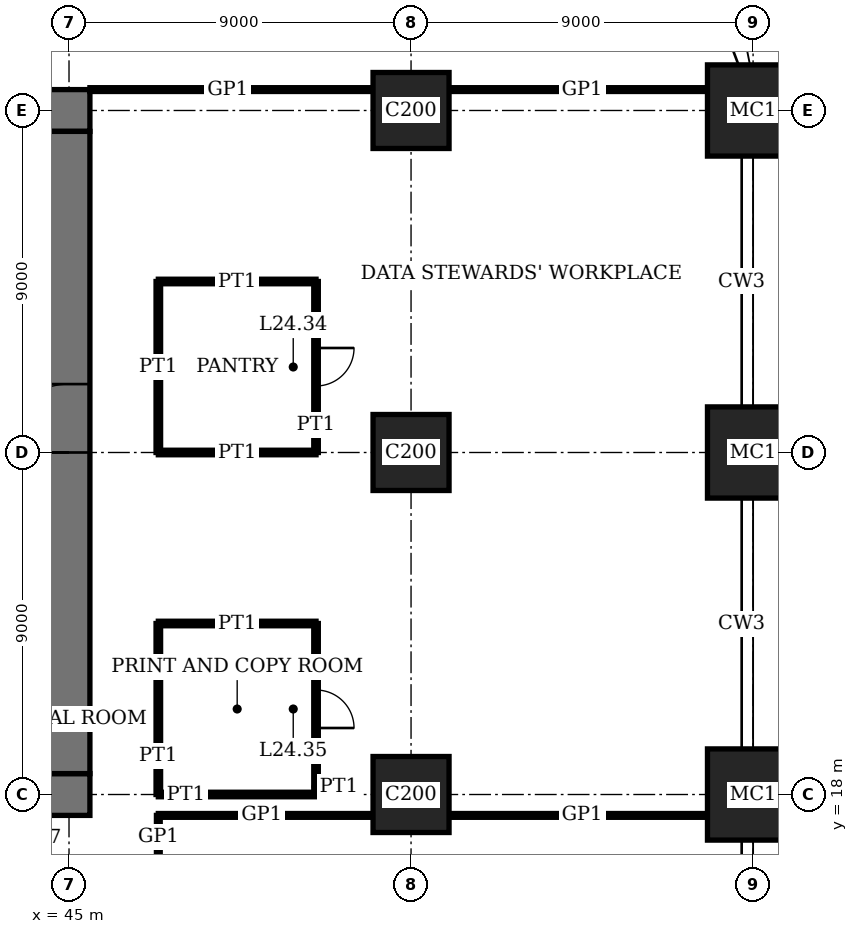
"""IFC4 building model, lengths in metres.
Left out: names, types, materials, properties, quantities, classifications, styles, units other than length and angle.
Written with IfcOpenShell. Run it as: python <this file> out.ifc"""

import sys

from ifc_helpers import new_model, si_unit, direction, frame, frame_2d, origin, origin_2d, place, context, subcontext, project, spatial, rectangle, extrude, element, fill, save


model = new_model("IFC4")
c1 = context("Model", 3, precision=1e-05, world=origin(), true_north=direction((0.0, 1.0)))
c2 = subcontext(c1, "Body", "Model", "MODEL_VIEW")
j1 = project(units=[si_unit("LENGTHUNIT", "METRE"), si_unit("PLANEANGLEUNIT", "RADIAN")], contexts=[c1])
p1 = place(None, origin())
s1 = spatial("IfcSite", under=j1, at=p1, CompositionType="ELEMENT")
p2 = place(p1, origin())
s2 = spatial("IfcBuilding", under=s1, at=p2, CompositionType="ELEMENT")
p3 = place(p2, frame((0.0, 0.0, 101.0)))
s3 = spatial("IfcBuildingStorey", under=s2, at=p3, CompositionType="ELEMENT", Elevation=101.0)
for number, where, z_axis, x_axis in (
    (1, (54.0, 18.0, 0.0), (0.0, 0.0, 1.0), (1.0, 0.0, 0.0)),
    (2, (54.0, 27.0, 0.0), (0.0, 0.0, 1.0), (1.0, 0.0, 0.0)),
    (3, (54.0, 36.0, 0.0), (0.0, 0.0, 1.0), (1.0, 0.0, 0.0)),
):
    element("IfcColumn", number, at=place(p3, frame(where, z_axis=z_axis, x_axis=x_axis)), inside=s3, PredefinedType="COLUMN", context=c2, shape_type="SweptSolid", body=[
        extrude(rectangle(XDim=2.0, YDim=2.0, at=origin_2d()), origin(), (0.0, 0.0, 1.0), 4.0),
    ])
for number, where, z_axis, x_axis in (
    (4, (63.0, 18.0, 0.0), (0.0, 0.0, 1.0), (1.0, 0.0, 0.0)),
    (5, (63.0, 27.0, 0.0), (0.0, 0.0, 1.0), (1.0, 0.0, 0.0)),
    (6, (63.0, 36.0, 0.0), (0.0, 0.0, 1.0), (1.0, 0.0, 0.0)),
):
    element("IfcColumn", number, at=place(p3, frame(where, z_axis=z_axis, x_axis=x_axis)), inside=s3, PredefinedType="COLUMN", context=c2, shape_type="SweptSolid", body=[
        extrude(rectangle(XDim=2.4, YDim=2.4, at=origin_2d()), origin(), (0.0, 0.0, 1.0), 4.0),
    ])
p4 = place(p3, frame((17.45, 18.0, 0.0), z_axis=(0.0, 0.0, 1.0), x_axis=(1.0, 0.0, 0.0)))
e7 = element("IfcWall", 7, at=p4, inside=s3, PredefinedType="SHEAR", context=c2, shape_type="SweptSolid", body=[
    extrude(rectangle(XDim=28.1, YDim=1.1, at=frame_2d((14.05, 0.0))), origin(), (0.0, 0.0, 1.0), 4.0),
])
p5 = place(p4, frame((11.55, 0.0, 0.0)))
e8 = element("IfcOpeningElement", 8, at=p5, cuts=e7, PredefinedType="OPENING", context=c2, shape_type="SweptSolid", body=[
    extrude(rectangle(XDim=1.0, YDim=2.4, at=frame_2d((0.5, 1.2))), frame((0.0, 0.56, 0.0), z_axis=(0.0, -1.0, 0.0), x_axis=(1.0, 0.0, 0.0)), (0.0, 0.0, 1.0), 1.12),
])
p6 = place(p4, frame((16.55, 0.0, 0.0)))
e9 = element("IfcOpeningElement", 9, at=p6, cuts=e7, PredefinedType="OPENING", context=c2, shape_type="SweptSolid", body=[
    extrude(rectangle(XDim=1.0, YDim=2.4, at=frame_2d((0.5, 1.2))), frame((0.0, 0.56, 0.0), z_axis=(0.0, -1.0, 0.0), x_axis=(1.0, 0.0, 0.0)), (0.0, 0.0, 1.0), 1.12),
])
p7 = place(p4, frame((20.0, 0.0, 0.0)))
e10 = element("IfcOpeningElement", 10, at=p7, cuts=e7, PredefinedType="OPENING", context=c2, shape_type="SweptSolid", body=[
    extrude(rectangle(XDim=1.1, YDim=2.4, at=frame_2d((0.55, 1.2))), frame((0.0, 0.56, 0.0), z_axis=(0.0, -1.0, 0.0), x_axis=(1.0, 0.0, 0.0)), (0.0, 0.0, 1.0), 1.12),
])
p8 = place(p4, frame((24.05, 0.0, 0.0)))
e11 = element("IfcOpeningElement", 11, at=p8, cuts=e7, PredefinedType="OPENING", context=c2, shape_type="SweptSolid", body=[
    extrude(rectangle(XDim=1.0, YDim=2.4, at=frame_2d((0.5, 1.2))), frame((0.0, 0.56, 0.0), z_axis=(0.0, -1.0, 0.0), x_axis=(1.0, 0.0, 0.0)), (0.0, 0.0, 1.0), 1.12),
])
p9 = place(p3, frame((45.55, 36.0, 0.0), z_axis=(0.0, 0.0, 1.0), x_axis=(-1.0, 0.0, 0.0)))
e12 = element("IfcWall", 12, at=p9, inside=s3, PredefinedType="SHEAR", context=c2, shape_type="SweptSolid", body=[
    extrude(rectangle(XDim=28.1, YDim=1.1, at=frame_2d((14.05, 0.0))), origin(), (0.0, 0.0, 1.0), 4.0),
])
p10 = place(p9, frame((11.55, 0.0, 0.0)))
e13 = element("IfcOpeningElement", 13, at=p10, cuts=e12, PredefinedType="OPENING", context=c2, shape_type="SweptSolid", body=[
    extrude(rectangle(XDim=1.0, YDim=2.4, at=frame_2d((0.5, 1.2))), frame((0.0, 0.56, 0.0), z_axis=(0.0, -1.0, 0.0), x_axis=(1.0, 0.0, 0.0)), (0.0, 0.0, 1.0), 1.12),
])
p11 = place(p9, frame((16.55, 0.0, 0.0)))
e14 = element("IfcOpeningElement", 14, at=p11, cuts=e12, PredefinedType="OPENING", context=c2, shape_type="SweptSolid", body=[
    extrude(rectangle(XDim=1.0, YDim=2.4, at=frame_2d((0.5, 1.2))), frame((0.0, 0.56, 0.0), z_axis=(0.0, -1.0, 0.0), x_axis=(1.0, 0.0, 0.0)), (0.0, 0.0, 1.0), 1.12),
])
p12 = place(p9, frame((20.0, 0.0, 0.0)))
e15 = element("IfcOpeningElement", 15, at=p12, cuts=e12, PredefinedType="OPENING", context=c2, shape_type="SweptSolid", body=[
    extrude(rectangle(XDim=1.1, YDim=2.4, at=frame_2d((0.55, 1.2))), frame((0.0, 0.56, 0.0), z_axis=(0.0, -1.0, 0.0), x_axis=(1.0, 0.0, 0.0)), (0.0, 0.0, 1.0), 1.12),
])
p13 = place(p9, frame((24.05, 0.0, 0.0)))
e16 = element("IfcOpeningElement", 16, at=p13, cuts=e12, PredefinedType="OPENING", context=c2, shape_type="SweptSolid", body=[
    extrude(rectangle(XDim=1.0, YDim=2.4, at=frame_2d((0.5, 1.2))), frame((0.0, 0.56, 0.0), z_axis=(0.0, -1.0, 0.0), x_axis=(1.0, 0.0, 0.0)), (0.0, 0.0, 1.0), 1.12),
])
p14 = place(p3, frame((45.0, 18.55, 0.0), z_axis=(0.0, 0.0, 1.0), x_axis=(0.0, 1.0, 0.0)))
e17 = element("IfcWall", 17, at=p14, inside=s3, PredefinedType="SHEAR", context=c2, shape_type="SweptSolid", body=[
    extrude(rectangle(XDim=16.9, YDim=1.1, at=frame_2d((8.45, 0.0))), origin(), (0.0, 0.0, 1.0), 4.0),
])
p15 = place(p14, frame((8.45, 0.0, 0.0)))
e18 = element("IfcOpeningElement", 18, at=p15, cuts=e17, PredefinedType="OPENING", context=c2, shape_type="SweptSolid", body=[
    extrude(rectangle(XDim=1.8, YDim=2.4, at=frame_2d((0.9, 1.2))), frame((0.0, 0.56, 0.0), z_axis=(0.0, -1.0, 0.0), x_axis=(1.0, 0.0, 0.0)), (0.0, 0.0, 1.0), 1.12),
])
p16 = place(p3, frame((47.35, 17.45, 0.0), z_axis=(0.0, 0.0, 1.0), x_axis=(1.0, 0.0, 0.0)))
e19 = element("IfcWall", 19, at=p16, inside=s3, PredefinedType="PARTITIONING", context=c2, shape_type="SweptSolid", body=[
    extrude(rectangle(XDim=5.65, YDim=0.1, at=frame_2d((2.825, 0.0))), origin(), (0.0, 0.0, 1.0), 3.75),
])
p17 = place(p3, frame((55.0, 17.45, 0.0), z_axis=(0.0, 0.0, 1.0), x_axis=(1.0, 0.0, 0.0)))
e20 = element("IfcWall", 20, at=p17, inside=s3, PredefinedType="PARTITIONING", context=c2, shape_type="SweptSolid", body=[
    extrude(rectangle(XDim=6.8, YDim=0.1, at=frame_2d((3.4, 0.0))), origin(), (0.0, 0.0, 1.0), 3.75),
])
p18 = place(p3, frame((47.35, 18.0, 0.0), z_axis=(0.0, 0.0, 1.0), x_axis=(1.0, 0.0, 0.0)))
e21 = element("IfcWall", 21, at=p18, inside=s3, PredefinedType="PARTITIONING", context=c2, shape_type="SweptSolid", body=[
    extrude(rectangle(XDim=4.15, YDim=0.12, at=frame_2d((2.075, 0.0))), origin(), (0.0, 0.0, 1.0), 3.05),
])
p19 = place(p3, frame((47.35, 22.5, 0.0), z_axis=(0.0, 0.0, 1.0), x_axis=(1.0, 0.0, 0.0)))
e22 = element("IfcWall", 22, at=p19, inside=s3, PredefinedType="PARTITIONING", context=c2, shape_type="SweptSolid", body=[
    extrude(rectangle(XDim=4.15, YDim=0.12, at=frame_2d((2.075, 0.0))), origin(), (0.0, 0.0, 1.0), 3.1),
])
p20 = place(p3, frame((47.35, 27.0, 0.0), z_axis=(0.0, 0.0, 1.0), x_axis=(1.0, 0.0, 0.0)))
e23 = element("IfcWall", 23, at=p20, inside=s3, PredefinedType="PARTITIONING", context=c2, shape_type="SweptSolid", body=[
    extrude(rectangle(XDim=4.15, YDim=0.12, at=frame_2d((2.075, 0.0))), origin(), (0.0, 0.0, 1.0), 3.05),
])
p21 = place(p3, frame((47.35, 31.5, 0.0), z_axis=(0.0, 0.0, 1.0), x_axis=(1.0, 0.0, 0.0)))
e24 = element("IfcWall", 24, at=p21, inside=s3, PredefinedType="PARTITIONING", context=c2, shape_type="SweptSolid", body=[
    extrude(rectangle(XDim=4.15, YDim=0.12, at=frame_2d((2.075, 0.0))), origin(), (0.0, 0.0, 1.0), 3.1),
])
p22 = place(p3, frame((45.55, 36.55, 0.0), z_axis=(0.0, 0.0, 1.0), x_axis=(1.0, 0.0, 0.0)))
e25 = element("IfcWall", 25, at=p22, inside=s3, PredefinedType="PARTITIONING", context=c2, shape_type="SweptSolid", body=[
    extrude(rectangle(XDim=7.45, YDim=0.1, at=frame_2d((3.725, 0.0))), origin(), (0.0, 0.0, 1.0), 3.75),
])
p23 = place(p3, frame((55.0, 36.55, 0.0), z_axis=(0.0, 0.0, 1.0), x_axis=(1.0, 0.0, 0.0)))
e26 = element("IfcWall", 26, at=p23, inside=s3, PredefinedType="PARTITIONING", context=c2, shape_type="SweptSolid", body=[
    extrude(rectangle(XDim=6.8, YDim=0.1, at=frame_2d((3.4, 0.0))), origin(), (0.0, 0.0, 1.0), 3.75),
])
for number, where, z_axis, x_axis in (
    (27, (47.35, 27.0, 0.0), (0.0, 0.0, 1.0), (0.0, 1.0, 0.0)),
    (28, (47.35, 18.0, 0.0), (0.0, 0.0, 1.0), (0.0, 1.0, 0.0)),
):
    element("IfcWall", number, at=place(p3, frame(where, z_axis=z_axis, x_axis=x_axis)), inside=s3, PredefinedType="PARTITIONING", context=c2, shape_type="SweptSolid", body=[
        extrude(rectangle(XDim=4.5, YDim=0.12, at=frame_2d((2.25, 0.0))), origin(), (0.0, 0.0, 1.0), 3.75),
    ])
p24 = place(p3, frame((47.35, 15.65, 0.0), z_axis=(0.0, 0.0, 1.0), x_axis=(0.0, 1.0, 0.0)))
e29 = element("IfcWall", 29, at=p24, inside=s3, PredefinedType="PARTITIONING", context=c2, shape_type="SweptSolid", body=[
    extrude(rectangle(XDim=1.8, YDim=0.1, at=frame_2d((0.9, 0.0))), origin(), (0.0, 0.0, 1.0), 3.75),
])
p25 = place(p3, frame((51.5, 27.0, 0.0), z_axis=(0.0, 0.0, 1.0), x_axis=(0.0, 1.0, 0.0)))
e30 = element("IfcWall", 30, at=p25, inside=s3, PredefinedType="PARTITIONING", context=c2, shape_type="SweptSolid", body=[
    extrude(rectangle(XDim=4.5, YDim=0.12, at=frame_2d((2.25, 0.0))), origin(), (0.0, 0.0, 1.0), 3.75),
])
p26 = place(p25, frame((1.75, 0.0, 0.0)))
e31 = element("IfcOpeningElement", 31, at=p26, cuts=e30, PredefinedType="OPENING", context=c2, shape_type="SweptSolid", body=[
    extrude(rectangle(XDim=1.0, YDim=2.4, at=frame_2d((0.5, 1.2))), frame((0.0, 0.07, 0.0), z_axis=(0.0, -1.0, 0.0), x_axis=(1.0, 0.0, 0.0)), (0.0, 0.0, 1.0), 0.14),
])
p27 = place(p3, frame((51.5, 18.0, 0.0), z_axis=(0.0, 0.0, 1.0), x_axis=(0.0, 1.0, 0.0)))
e32 = element("IfcWall", 32, at=p27, inside=s3, PredefinedType="PARTITIONING", context=c2, shape_type="SweptSolid", body=[
    extrude(rectangle(XDim=4.5, YDim=0.12, at=frame_2d((2.25, 0.0))), origin(), (0.0, 0.0, 1.0), 3.75),
])
p28 = place(p27, frame((1.75, 0.0, 0.0)))
e33 = element("IfcOpeningElement", 33, at=p28, cuts=e32, PredefinedType="OPENING", context=c2, shape_type="SweptSolid", body=[
    extrude(rectangle(XDim=1.0, YDim=2.4, at=frame_2d((0.5, 1.2))), frame((0.0, 0.07, 0.0), z_axis=(0.0, -1.0, 0.0), x_axis=(1.0, 0.0, 0.0)), (0.0, 0.0, 1.0), 0.14),
])
p29 = place(p15, origin())
e34 = element("IfcDoor", 34, at=p29, inside=s3, OperationType="DOUBLE_DOOR_DOUBLE_SWING", PredefinedType="DOOR", context=c2, shape_type="SweptSolid", body=[
    extrude(rectangle(XDim=1.8, YDim=2.4, at=frame_2d((0.9, 1.2))), frame((0.0, 0.03, 0.0), z_axis=(0.0, -1.0, 0.0), x_axis=(1.0, 0.0, 0.0)), (0.0, 0.0, 1.0), 0.06),
    extrude(rectangle(XDim=0.04, YDim=2.4, at=frame_2d((0.02, 1.2))), frame((0.0, 0.55, 0.0), z_axis=(0.0, -1.0, 0.0), x_axis=(1.0, 0.0, 0.0)), (0.0, 0.0, 1.0), 1.1),
    extrude(rectangle(XDim=0.04, YDim=2.4, at=frame_2d((1.78, 1.2))), frame((0.0, 0.55, 0.0), z_axis=(0.0, -1.0, 0.0), x_axis=(1.0, 0.0, 0.0)), (0.0, 0.0, 1.0), 1.1),
    extrude(rectangle(XDim=1.8, YDim=0.04, at=frame_2d((0.9, 2.38))), frame((0.0, 0.55, 0.0), z_axis=(0.0, -1.0, 0.0), x_axis=(1.0, 0.0, 0.0)), (0.0, 0.0, 1.0), 1.1),
])
fill(e18, e34)
p30 = place(p26, origin())
e35 = element("IfcDoor", 35, at=p30, inside=s3, OperationType="SINGLE_SWING_RIGHT", PredefinedType="DOOR", context=c2, shape_type="SweptSolid", body=[
    extrude(rectangle(XDim=1.0, YDim=2.4, at=frame_2d((0.5, 1.2))), frame((0.0, 0.025, 0.0), z_axis=(0.0, -1.0, 0.0), x_axis=(1.0, 0.0, 0.0)), (0.0, 0.0, 1.0), 0.05),
])
fill(e31, e35)
p31 = place(p28, origin())
e36 = element("IfcDoor", 36, at=p31, inside=s3, OperationType="SINGLE_SWING_LEFT", PredefinedType="DOOR", context=c2, shape_type="SweptSolid", body=[
    extrude(rectangle(XDim=1.0, YDim=2.4, at=frame_2d((0.5, 1.2))), frame((0.0, 0.025, 0.0), z_axis=(0.0, -1.0, 0.0), x_axis=(1.0, 0.0, 0.0)), (0.0, 0.0, 1.0), 0.05),
])
fill(e33, e36)
save(model, sys.argv[1])
